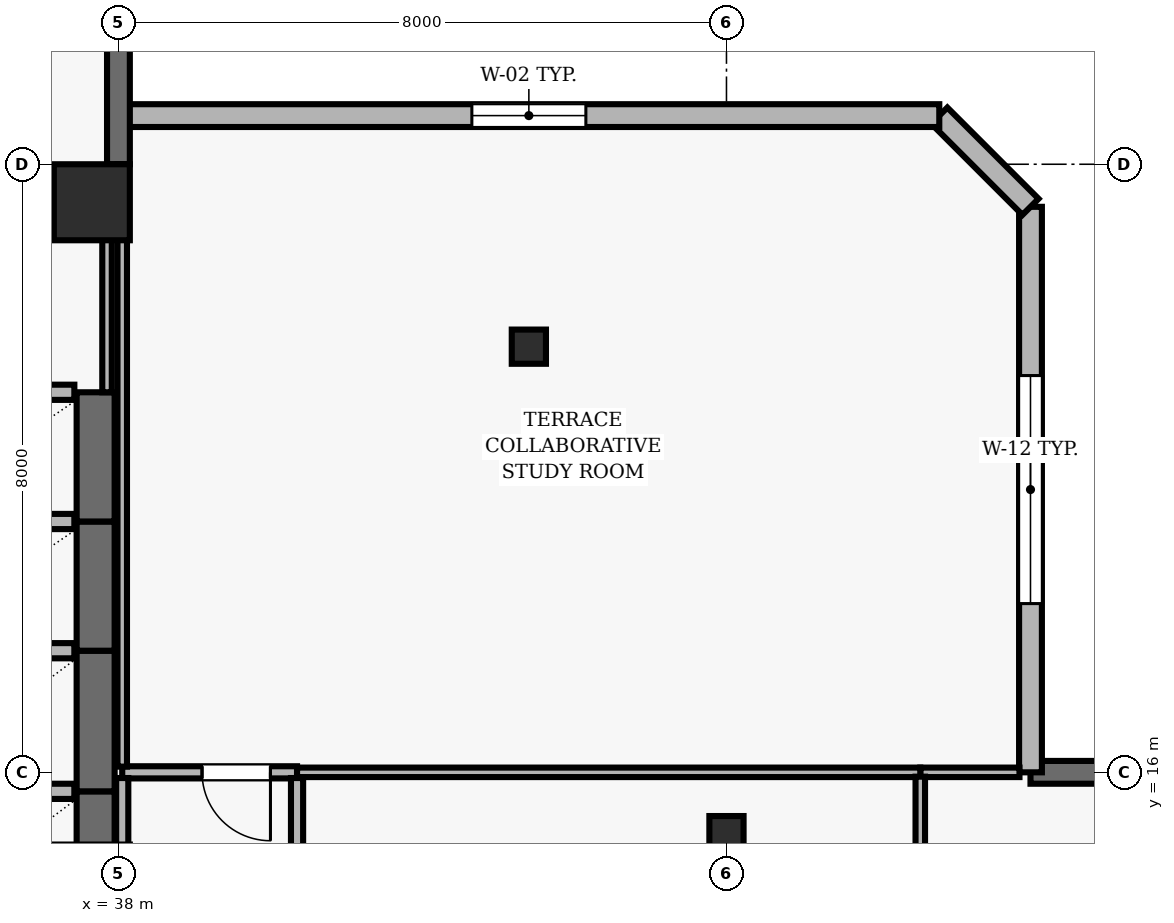
"""IFC4 building model, lengths in metres.
Left out: names, types, materials, properties, quantities, classifications, styles, units other than length and angle.
Written with IfcOpenShell. Run it as: python <this file> out.ifc"""

import sys

from ifc_helpers import new_model, si_unit, direction, frame, frame_2d, origin, origin_2d, place, context, subcontext, project, spatial, rectangle, hollow_rectangle, extrude, element, fill, save


model = new_model("IFC4")
c1 = context("Model", 3, precision=1e-05, world=origin(), true_north=direction((0.0, 1.0)))
c2 = subcontext(c1, "Body", "Model", "MODEL_VIEW")
j1 = project(units=[si_unit("LENGTHUNIT", "METRE"), si_unit("PLANEANGLEUNIT", "RADIAN")], contexts=[c1])
p1 = place(None, origin())
s1 = spatial("IfcSite", under=j1, at=p1, CompositionType="ELEMENT")
p2 = place(p1, origin())
s2 = spatial("IfcBuilding", under=s1, at=p2, CompositionType="ELEMENT")
p3 = place(p2, frame((0.0, 0.0, 175.8)))
s3 = spatial("IfcBuildingStorey", under=s2, at=p3, CompositionType="ELEMENT", Elevation=175.8)
p4 = place(p3, frame((37.65, 23.5, 0.0), z_axis=(0.0, 0.0, 1.0), x_axis=(1.0, 0.0, 0.0)))
e1 = element("IfcColumn", 1, at=p4, inside=s3, PredefinedType="COLUMN", context=c2, shape_type="SweptSolid", body=[
    extrude(rectangle(XDim=1.0, YDim=1.0, at=origin_2d()), origin(), (0.0, 0.0, 1.0), 3.9),
])
for number, where, z_axis, x_axis in (
    (2, (46.0, 15.2, 0.0), (0.0, 0.0, 1.0), (1.0, 0.0, 0.0)),
    (3, (43.4, 21.6, 0.0), (0.0, 0.0, 1.0), (1.0, 0.0, 0.0)),
):
    element("IfcColumn", number, at=place(p3, frame(where, z_axis=z_axis, x_axis=x_axis)), inside=s3, PredefinedType="COLUMN", context=c2, shape_type="SweptSolid", body=[
        extrude(hollow_rectangle(XDim=0.45, YDim=0.45, WallThickness=0.02, at=origin_2d()), origin(), (0.0, 0.0, 1.0), 3.9),
    ])
p5 = place(p3, frame((62.7, 16.0, 0.0), z_axis=(0.0, 0.0, 1.0), x_axis=(-1.0, 0.0, 0.0)))
e4 = element("IfcWall", 4, at=p5, inside=s3, PredefinedType="SOLIDWALL", context=c2, shape_type="SweptSolid", body=[
    extrude(rectangle(XDim=12.7, YDim=0.3, at=frame_2d((6.35, 0.0))), origin(), (0.0, 0.0, 1.0), 3.69),
])
p6 = place(p5, frame((6.85, 0.0, 0.0)))
e5 = element("IfcOpeningElement", 5, at=p6, cuts=e4, PredefinedType="OPENING", context=c2, shape_type="SweptSolid", body=[
    extrude(rectangle(XDim=1.0, YDim=2.2, at=frame_2d((0.5, 1.1))), frame((0.0, 0.16, 0.0), z_axis=(0.0, -1.0, 0.0), x_axis=(1.0, 0.0, 0.0)), (0.0, 0.0, 1.0), 0.32),
])
p7 = place(p5, frame((1.525, 0.0, 0.9)))
e6 = element("IfcOpeningElement", 6, at=p7, cuts=e4, PredefinedType="OPENING", context=c2, shape_type="SweptSolid", body=[
    extrude(rectangle(XDim=2.4, YDim=2.2, at=frame_2d((1.2, 1.1))), frame((0.0, 0.16, 0.0), z_axis=(0.0, -1.0, 0.0), x_axis=(1.0, 0.0, 0.0)), (0.0, 0.0, 1.0), 0.32),
])
p8 = place(p5, frame((8.325, 0.0, 0.9)))
e7 = element("IfcOpeningElement", 7, at=p8, cuts=e4, PredefinedType="OPENING", context=c2, shape_type="SweptSolid", body=[
    extrude(rectangle(XDim=2.4, YDim=2.2, at=frame_2d((1.2, 1.1))), frame((0.0, 0.16, 0.0), z_axis=(0.0, -1.0, 0.0), x_axis=(1.0, 0.0, 0.0)), (0.0, 0.0, 1.0), 0.32),
])
p9 = place(p3, frame((50.0, 16.0, 0.0), z_axis=(0.0, 0.0, 1.0), x_axis=(0.0, 1.0, 0.0)))
e8 = element("IfcWall", 8, at=p9, inside=s3, PredefinedType="SOLIDWALL", context=c2, shape_type="SweptSolid", body=[
    extrude(rectangle(XDim=7.44, YDim=0.3, at=frame_2d((3.72, 0.0))), origin(), (0.0, 0.0, 1.0), 3.69),
])
p10 = place(p9, frame((2.22, 0.0, 0.9)))
e9 = element("IfcOpeningElement", 9, at=p10, cuts=e8, PredefinedType="OPENING", context=c2, shape_type="SweptSolid", body=[
    extrude(rectangle(XDim=3.0, YDim=2.2, at=frame_2d((1.5, 1.1))), frame((0.0, 0.16, 0.0), z_axis=(0.0, -1.0, 0.0), x_axis=(1.0, 0.0, 0.0)), (0.0, 0.0, 1.0), 0.32),
])
p11 = place(p3, frame((50.0, 23.44, 0.0), z_axis=(0.0, 0.0, 1.0), x_axis=(-0.707106781187, 0.707106781187, 0.0)))
e10 = element("IfcWall", 10, at=p11, inside=s3, PredefinedType="SOLIDWALL", context=c2, shape_type="SweptSolid", body=[
    extrude(rectangle(XDim=1.697, YDim=0.3, at=frame_2d((0.849, 0.0))), origin(), (0.0, 0.0, 1.0), 3.69),
])
p12 = place(p3, frame((48.8, 24.64, 0.0), z_axis=(0.0, 0.0, 1.0), x_axis=(-1.0, 0.0, 0.0)))
e11 = element("IfcWall", 11, at=p12, inside=s3, PredefinedType="SOLIDWALL", context=c2, shape_type="SweptSolid", body=[
    extrude(rectangle(XDim=10.8, YDim=0.3, at=frame_2d((5.4, 0.0))), origin(), (0.0, 0.0, 1.0), 3.69),
])
p13 = place(p12, frame((4.65, 0.0, 0.9)))
e12 = element("IfcOpeningElement", 12, at=p13, cuts=e11, PredefinedType="OPENING", context=c2, shape_type="SweptSolid", body=[
    extrude(rectangle(XDim=1.5, YDim=1.6, at=frame_2d((0.75, 0.8))), frame((0.0, 0.16, 0.0), z_axis=(0.0, -1.0, 0.0), x_axis=(1.0, 0.0, 0.0)), (0.0, 0.0, 1.0), 0.32),
])
p14 = place(p3, frame((38.0, 24.0, 0.0), z_axis=(0.0, 0.0, 1.0), x_axis=(0.0, 1.0, 0.0)))
e13 = element("IfcWall", 13, at=p14, inside=s3, PredefinedType="SOLIDWALL", context=c2, shape_type="SweptSolid", body=[
    extrude(rectangle(XDim=16.7, YDim=0.3, at=frame_2d((8.35, 0.0))), origin(), (0.0, 0.0, 1.0), 3.69),
])
p15 = place(p14, frame((7.81, 0.0, 0.0)))
e14 = element("IfcOpeningElement", 14, at=p15, cuts=e13, PredefinedType="OPENING", context=c2, shape_type="SweptSolid", body=[
    extrude(rectangle(XDim=1.0, YDim=2.2, at=frame_2d((0.5, 1.1))), frame((0.0, 0.16, 0.0), z_axis=(0.0, -1.0, 0.0), x_axis=(1.0, 0.0, 0.0)), (0.0, 0.0, 1.0), 0.32),
])
p16 = place(p14, frame((2.665, 0.0, 0.9)))
e15 = element("IfcOpeningElement", 15, at=p16, cuts=e13, PredefinedType="OPENING", context=c2, shape_type="SweptSolid", body=[
    extrude(rectangle(XDim=1.8, YDim=1.6, at=frame_2d((0.9, 0.8))), frame((0.0, 0.16, 0.0), z_axis=(0.0, -1.0, 0.0), x_axis=(1.0, 0.0, 0.0)), (0.0, 0.0, 1.0), 0.32),
])
p17 = place(p3, frame((37.7, 13.9, 0.0), z_axis=(0.0, 0.0, 1.0), x_axis=(0.0, 1.0, 0.0)))
e16 = element("IfcWall", 16, at=p17, inside=s3, PredefinedType="SHEAR", context=c2, shape_type="SweptSolid", body=[
    extrude(rectangle(XDim=1.85, YDim=0.5, at=frame_2d((0.925, 0.0))), origin(), (0.0, 0.0, 1.0), 3.69),
])
p18 = place(p3, frame((37.42, 15.75, 0.0), z_axis=(0.0, 0.0, 1.0), x_axis=(-1.0, 0.0, 0.0)))
e17 = element("IfcWall", 17, at=p18, inside=s3, PredefinedType="SOLIDWALL", context=c2, shape_type="SweptSolid", body=[
    extrude(rectangle(XDim=2.14, YDim=0.2, at=frame_2d((1.07, 0.0))), origin(), (0.0, 0.0, 1.0), 3.69),
])
p19 = place(p3, frame((37.7, 15.75, 0.0), z_axis=(0.0, 0.0, 1.0), x_axis=(0.0, 1.0, 0.0)))
e18 = element("IfcWall", 18, at=p19, inside=s3, PredefinedType="SHEAR", context=c2, shape_type="SweptSolid", body=[
    extrude(rectangle(XDim=1.85, YDim=0.5, at=frame_2d((0.925, 0.0))), origin(), (0.0, 0.0, 1.0), 3.69),
])
p20 = place(p3, frame((37.42, 17.6, 0.0), z_axis=(0.0, 0.0, 1.0), x_axis=(-1.0, 0.0, 0.0)))
e19 = element("IfcWall", 19, at=p20, inside=s3, PredefinedType="SOLIDWALL", context=c2, shape_type="SweptSolid", body=[
    extrude(rectangle(XDim=2.14, YDim=0.2, at=frame_2d((1.07, 0.0))), origin(), (0.0, 0.0, 1.0), 3.69),
])
p21 = place(p3, frame((37.7, 17.6, 0.0), z_axis=(0.0, 0.0, 1.0), x_axis=(0.0, 1.0, 0.0)))
e20 = element("IfcWall", 20, at=p21, inside=s3, PredefinedType="SHEAR", context=c2, shape_type="SweptSolid", body=[
    extrude(rectangle(XDim=1.7, YDim=0.5, at=frame_2d((0.85, 0.0))), origin(), (0.0, 0.0, 1.0), 3.69),
])
p22 = place(p3, frame((37.42, 19.3, 0.0), z_axis=(0.0, 0.0, 1.0), x_axis=(-1.0, 0.0, 0.0)))
e21 = element("IfcWall", 21, at=p22, inside=s3, PredefinedType="SOLIDWALL", context=c2, shape_type="SweptSolid", body=[
    extrude(rectangle(XDim=2.14, YDim=0.2, at=frame_2d((1.07, 0.0))), origin(), (0.0, 0.0, 1.0), 3.69),
])
p23 = place(p3, frame((37.7, 19.3, 0.0), z_axis=(0.0, 0.0, 1.0), x_axis=(0.0, 1.0, 0.0)))
e22 = element("IfcWall", 22, at=p23, inside=s3, PredefinedType="SHEAR", context=c2, shape_type="SweptSolid", body=[
    extrude(rectangle(XDim=1.7, YDim=0.5, at=frame_2d((0.85, 0.0))), origin(), (0.0, 0.0, 1.0), 3.69),
])
p24 = place(p3, frame((37.42, 21.0, 0.0), z_axis=(0.0, 0.0, 1.0), x_axis=(-1.0, 0.0, 0.0)))
e23 = element("IfcWall", 23, at=p24, inside=s3, PredefinedType="SOLIDWALL", context=c2, shape_type="SweptSolid", body=[
    extrude(rectangle(XDim=2.14, YDim=0.2, at=frame_2d((1.07, 0.0))), origin(), (0.0, 0.0, 1.0), 3.69),
])
p25 = place(p3, frame((37.85, 23.85, 0.0), z_axis=(0.0, 0.0, 1.0), x_axis=(-1.0, 0.0, 0.0)))
e24 = element("IfcWall", 24, at=p25, inside=s3, PredefinedType="PARTITIONING", context=c2, shape_type="SweptSolid", body=[
    extrude(rectangle(XDim=4.0, YDim=0.16, at=frame_2d((2.0, 0.0))), origin(), (0.0, 0.0, 1.0), 3.139),
])
p26 = place(p25, frame((2.25, 0.0, 0.0)))
e25 = element("IfcOpeningElement", 25, at=p26, cuts=e24, PredefinedType="OPENING", context=c2, shape_type="SweptSolid", body=[
    extrude(rectangle(XDim=0.9, YDim=2.1, at=frame_2d((0.45, 1.05))), frame((0.0, 0.09, 0.0), z_axis=(0.0, -1.0, 0.0), x_axis=(1.0, 0.0, 0.0)), (0.0, 0.0, 1.0), 0.18),
])
p27 = place(p3, frame((40.35, 16.0, 0.0), z_axis=(0.0, 0.0, 1.0), x_axis=(-1.0, 0.0, 0.0)))
e26 = element("IfcWall", 26, at=p27, inside=s3, PredefinedType="PARTITIONING", context=c2, shape_type="SweptSolid", body=[
    extrude(rectangle(XDim=2.3, YDim=0.16, at=frame_2d((1.15, 0.0))), origin(), (0.0, 0.0, 1.0), 3.69),
])
p28 = place(p27, frame((0.35, 0.0, 0.0)))
e27 = element("IfcOpeningElement", 27, at=p28, cuts=e26, PredefinedType="OPENING", context=c2, shape_type="SweptSolid", body=[
    extrude(rectangle(XDim=0.9, YDim=2.1, at=frame_2d((0.45, 1.05))), frame((0.0, 0.09, 0.0), z_axis=(0.0, -1.0, 0.0), x_axis=(1.0, 0.0, 0.0)), (0.0, 0.0, 1.0), 0.18),
])
p29 = place(p3, frame((48.55, 16.0, 0.0), z_axis=(0.0, 0.0, 1.0), x_axis=(1.0, 0.0, 0.0)))
e28 = element("IfcWall", 28, at=p29, inside=s3, PredefinedType="PARTITIONING", context=c2, shape_type="SweptSolid", body=[
    extrude(rectangle(XDim=1.305, YDim=0.125, at=frame_2d((0.652, 0.0))), origin(), (0.0, 0.0, 1.0), 3.69),
])
p30 = place(p3, frame((48.55, 16.0, 0.0), z_axis=(0.0, 0.0, 1.0), x_axis=(-1.0, 0.0, 0.0)))
e29 = element("IfcWall", 29, at=p30, inside=s3, PredefinedType="PARTITIONING", context=c2, shape_type="SweptSolid", body=[
    extrude(rectangle(XDim=8.2, YDim=0.125, at=frame_2d((4.1, 0.0))), origin(), (0.0, 0.0, 1.0), 3.69),
])
p31 = place(p3, frame((37.85, 21.0, 0.0), z_axis=(0.0, 0.0, 1.0), x_axis=(0.0, 1.0, 0.0)))
e30 = element("IfcWall", 30, at=p31, inside=s3, PredefinedType="PARTITIONING", context=c2, shape_type="SweptSolid", body=[
    extrude(rectangle(XDim=2.775, YDim=0.125, at=frame_2d((1.387, 0.0))), origin(), (0.0, 0.0, 1.0), 3.139),
])
p32 = place(p3, frame((38.05, 15.925, 0.0), z_axis=(0.0, 0.0, 1.0), x_axis=(0.0, -1.0, 0.0)))
e31 = element("IfcWall", 31, at=p32, inside=s3, PredefinedType="PARTITIONING", context=c2, shape_type="SweptSolid", body=[
    extrude(rectangle(XDim=6.375, YDim=0.16, at=frame_2d((3.188, 0.0))), origin(), (0.0, 0.0, 1.0), 3.139),
])
p33 = place(p3, frame((38.05, 24.0, 0.0), z_axis=(0.0, 0.0, 1.0), x_axis=(0.0, -1.0, 0.0)))
e32 = element("IfcWall", 32, at=p33, inside=s3, PredefinedType="PARTITIONING", context=c2, shape_type="SweptSolid", body=[
    extrude(rectangle(XDim=7.925, YDim=0.125, at=frame_2d((3.962, 0.0))), origin(), (0.0, 0.0, 1.0), 3.139),
])
p34 = place(p3, frame((40.35, 7.625, 0.0), z_axis=(0.0, 0.0, 1.0), x_axis=(0.0, 1.0, 0.0)))
e33 = element("IfcWall", 33, at=p34, inside=s3, PredefinedType="PARTITIONING", context=c2, shape_type="SweptSolid", body=[
    extrude(rectangle(XDim=8.3, YDim=0.16, at=frame_2d((4.15, 0.0))), origin(), (0.0, 0.0, 1.0), 3.343),
])
p35 = place(p34, frame((3.65, 0.0, 0.0)))
e34 = element("IfcOpeningElement", 34, at=p35, cuts=e33, PredefinedType="OPENING", context=c2, shape_type="SweptSolid", body=[
    extrude(rectangle(XDim=1.0, YDim=2.1, at=frame_2d((0.5, 1.05))), frame((0.0, 0.09, 0.0), z_axis=(0.0, -1.0, 0.0), x_axis=(1.0, 0.0, 0.0)), (0.0, 0.0, 1.0), 0.18),
])
p36 = place(p3, frame((48.55, 7.625, 0.0), z_axis=(0.0, 0.0, 1.0), x_axis=(0.0, 1.0, 0.0)))
e35 = element("IfcWall", 35, at=p36, inside=s3, PredefinedType="PARTITIONING", context=c2, shape_type="SweptSolid", body=[
    extrude(rectangle(XDim=8.318, YDim=0.125, at=frame_2d((4.159, 0.0))), origin(), (0.0, 0.0, 1.0), 3.69),
])
p37 = place(p10, origin())
e36 = element("IfcWindow", 36, at=p37, inside=s3, PartitioningType="SINGLE_PANEL", PredefinedType="WINDOW", context=c2, shape_type="SweptSolid", body=[
    extrude(rectangle(XDim=3.0, YDim=2.2, at=frame_2d((1.5, 1.1))), frame((0.0, 0.03, 0.0), z_axis=(0.0, -1.0, 0.0), x_axis=(1.0, 0.0, 0.0)), (0.0, 0.0, 1.0), 0.06),
])
fill(e9, e36)
p38 = place(p13, origin())
e37 = element("IfcWindow", 37, at=p38, inside=s3, PartitioningType="SINGLE_PANEL", PredefinedType="WINDOW", context=c2, shape_type="SweptSolid", body=[
    extrude(rectangle(XDim=1.5, YDim=1.6, at=frame_2d((0.75, 0.8))), frame((0.0, 0.03, 0.0), z_axis=(0.0, -1.0, 0.0), x_axis=(1.0, 0.0, 0.0)), (0.0, 0.0, 1.0), 0.06),
])
fill(e12, e37)
p39 = place(p28, origin())
e38 = element("IfcDoor", 38, at=p39, inside=s3, OperationType="SINGLE_SWING_LEFT", PredefinedType="DOOR", context=c2, shape_type="SweptSolid", body=[
    extrude(rectangle(XDim=0.9, YDim=2.1, at=frame_2d((0.45, 1.05))), frame((0.0, 0.025, 0.0), z_axis=(0.0, -1.0, 0.0), x_axis=(1.0, 0.0, 0.0)), (0.0, 0.0, 1.0), 0.05),
])
fill(e27, e38)
save(model, sys.argv[1])
